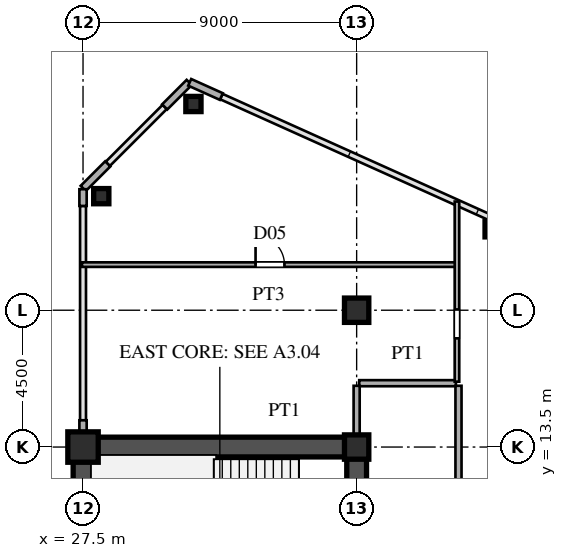
"""IFC4 building model, lengths in metres.
Left out: names, types, materials, properties, quantities, classifications, styles, units other than length and angle.
Written with IfcOpenShell. Run it as: python <this file> out.ifc"""

import sys

from ifc_helpers import new_model, si_unit, direction, frame, frame_2d, origin, origin_2d, place, context, subcontext, project, spatial, rectangle, hollow_rectangle, i_section, extrude, source, transform, mapped, element, fill, save


model = new_model("IFC4")
c1 = context("Model", 3, precision=1e-05, world=origin(), true_north=direction((0.0, 1.0)))
c2 = subcontext(c1, "Body", "Model", "MODEL_VIEW")
j1 = project(units=[si_unit("LENGTHUNIT", "METRE"), si_unit("PLANEANGLEUNIT", "RADIAN")], contexts=[c1])
p1 = place(None, origin())
s1 = spatial("IfcSite", under=j1, at=p1, CompositionType="ELEMENT")
p2 = place(p1, origin())
s2 = spatial("IfcBuilding", under=s1, at=p2, CompositionType="ELEMENT")
p3 = place(p2, frame((0.0, 0.0, 96.0)))
s3 = spatial("IfcBuildingStorey", under=s2, at=p3, CompositionType="ELEMENT", Elevation=96.0)
m1 = source(origin(), c2, "Body", "SweptSolid", [
    extrude(hollow_rectangle(XDim=1.0, YDim=1.0, WallThickness=0.042, at=origin_2d()), origin(), (0.0, 0.0, 1.0), 3.6),
])
p4 = place(p3, frame((27.5, 13.5, 0.0), z_axis=(0.0, 0.0, 1.0), x_axis=(1.0, 0.0, 0.0)))
e1 = element("IfcColumn", 1, at=p4, inside=s3, PredefinedType="COLUMN", context=c2, shape_type="MappedRepresentation", body=[
    mapped(m1, transform((0.0, 0.0, 0.0), scale=1.0)),
])
m2 = source(origin(), c2, "Body", "SweptSolid", [
    extrude(i_section(OverallWidth=0.8, OverallDepth=0.8, WebThickness=0.032, FlangeThickness=0.05, at=origin_2d()), origin(), (0.0, 0.0, 1.0), 3.6),
])
for number, where, z_axis, x_axis in (
    (2, (36.5, 13.5, 0.0), (0.0, 0.0, 1.0), (1.0, 0.0, 0.0)),
    (3, (36.5, 18.0, 0.0), (0.0, 0.0, 1.0), (1.0, 0.0, 0.0)),
):
    element("IfcColumn", number, at=place(p3, frame(where, z_axis=z_axis, x_axis=x_axis)), inside=s3, PredefinedType="COLUMN", context=c2, shape_type="MappedRepresentation", body=[
        mapped(m2, transform((0.0, 0.0, 0.0), scale=1.0)),
    ])
m3 = source(origin(), c2, "Body", "SweptSolid", [
    extrude(hollow_rectangle(XDim=0.5, YDim=0.5, WallThickness=0.02, at=origin_2d()), origin(), (0.0, 0.0, 1.0), 3.6),
])
for number, where, z_axis, x_axis in (
    (4, (31.131, 24.783, 0.0), (0.0, 0.0, 1.0), (1.0, 0.0, 0.0)),
    (5, (28.1, 21.751, 0.0), (0.0, 0.0, 1.0), (1.0, 0.0, 0.0)),
    (6, (40.973, 20.661, 0.0), (0.0, 0.0, 1.0), (1.0, 0.0, 0.0)),
):
    element("IfcColumn", number, at=place(p3, frame(where, z_axis=z_axis, x_axis=x_axis)), inside=s3, PredefinedType="COLUMN", context=c2, shape_type="MappedRepresentation", body=[
        mapped(m3, transform((0.0, 0.0, 0.0), scale=1.0)),
    ])
p5 = place(p3, frame((32.049, 25.028, 0.0), z_axis=(0.0, 0.0, 1.0), x_axis=(-0.911929519623, 0.410346866979, 0.0)))
e7 = element("IfcWall", 7, at=p5, inside=s3, PredefinedType="SOLIDWALL", context=c2, shape_type="SweptSolid", body=[
    extrude(rectangle(XDim=1.14, YDim=0.24, at=frame_2d((0.57, 0.0))), origin(), (0.0, 0.0, 1.0), 3.38),
])
for number, where, z_axis, x_axis in (
    (8, (30.993, 25.493, 0.0), (0.0, 0.0, 1.0), (-0.707, -0.707, 0.0)),
    (9, (28.313, 22.813, 0.0), (0.0, 0.0, 1.0), (-0.707, -0.707, 0.0)),
):
    element("IfcWall", number, at=place(p3, frame(where, z_axis=z_axis, x_axis=x_axis)), inside=s3, PredefinedType="SOLIDWALL", context=c2, shape_type="SweptSolid", body=[
        extrude(rectangle(XDim=1.14, YDim=0.24, at=frame_2d((0.57, 0.0))), origin(), (0.0, 0.0, 1.0), 3.38),
    ])
p6 = place(p3, frame((27.5, 13.83, 0.0), z_axis=(0.0, 0.0, 1.0), x_axis=(0.0, 1.0, 0.0)))
e10 = element("IfcWall", 10, at=p6, inside=s3, PredefinedType="SOLIDWALL", context=c2, shape_type="SweptSolid", body=[
    extrude(rectangle(XDim=0.55, YDim=0.24, at=frame_2d((0.275, 0.0))), origin(), (0.0, 0.0, 1.0), 2.88),
])
p7 = place(p3, frame((27.5, 21.43, 0.0), z_axis=(0.0, 0.0, 1.0), x_axis=(0.0, 1.0, 0.0)))
e11 = element("IfcWall", 11, at=p7, inside=s3, PredefinedType="SOLIDWALL", context=c2, shape_type="SweptSolid", body=[
    extrude(rectangle(XDim=0.55, YDim=0.24, at=frame_2d((0.275, 0.0))), origin(), (0.0, 0.0, 1.0), 3.38),
])
p8 = place(p3, frame((27.5, 1.3, 0.0), z_axis=(0.0, 0.0, 1.0), x_axis=(0.0, 1.0, 0.0)))
e12 = element("IfcWall", 12, at=p8, inside=s3, PredefinedType="SHEAR", context=c2, shape_type="SweptSolid", body=[
    extrude(rectangle(XDim=12.2, YDim=0.65, at=frame_2d((6.1, 0.0))), origin(), (0.0, 0.0, 1.0), 3.38),
])
p9 = place(p3, frame((27.5, 13.5, 0.0), z_axis=(0.0, 0.0, 1.0), x_axis=(1.0, 0.0, 0.0)))
e13 = element("IfcWall", 13, at=p9, inside=s3, PredefinedType="SHEAR", context=c2, shape_type="SweptSolid", body=[
    extrude(rectangle(XDim=9.0, YDim=0.65, at=frame_2d((4.5, 0.0))), origin(), (0.0, 0.0, 1.0), 3.38),
])
p10 = place(p3, frame((36.5, 8.2, 0.0), z_axis=(0.0, 0.0, 1.0), x_axis=(0.0, 1.0, 0.0)))
e14 = element("IfcWall", 14, at=p10, inside=s3, PredefinedType="SHEAR", context=c2, shape_type="SweptSolid", body=[
    extrude(rectangle(XDim=5.45, YDim=0.65, at=frame_2d((2.725, 0.0))), origin(), (0.0, 0.0, 1.0), 3.38),
])
p11 = place(p10, frame((0.245, 0.0, 0.0)))
e15 = element("IfcOpeningElement", 15, at=p11, cuts=e14, PredefinedType="OPENING", context=c2, shape_type="SweptSolid", body=[
    extrude(rectangle(XDim=0.95, YDim=2.15, at=frame_2d((0.475, 1.075))), frame((0.0, 0.335, 0.0), z_axis=(0.0, -1.0, 0.0), x_axis=(1.0, 0.0, 0.0)), (0.0, 0.0, 1.0), 0.67),
])
p12 = place(p3, frame((36.585, 15.6, 0.0), z_axis=(0.0, 0.0, 1.0), x_axis=(1.0, 0.0, 0.0)))
e16 = element("IfcWall", 16, at=p12, inside=s3, PredefinedType="PARTITIONING", context=c2, shape_type="SweptSolid", body=[
    extrude(rectangle(XDim=3.18, YDim=0.2, at=frame_2d((1.59, 0.0))), origin(), (0.0, 0.0, 1.0), 3.38),
])
p13 = place(p3, frame((27.465, 19.5, 0.0), z_axis=(0.0, 0.0, 1.0), x_axis=(1.0, 0.0, 0.0)))
e17 = element("IfcWall", 17, at=p13, inside=s3, PredefinedType="PARTITIONING", context=c2, shape_type="SweptSolid", body=[
    extrude(rectangle(XDim=12.285, YDim=0.15, at=frame_2d((6.143, 0.0))), origin(), (0.0, 0.0, 1.0), 3.38),
])
p14 = place(p13, frame((5.71, 0.0, 0.0)))
e18 = element("IfcOpeningElement", 18, at=p14, cuts=e17, PredefinedType="OPENING", context=c2, shape_type="SweptSolid", body=[
    extrude(rectangle(XDim=0.95, YDim=2.15, at=frame_2d((0.475, 1.075))), frame((0.0, 0.085, 0.0), z_axis=(0.0, -1.0, 0.0), x_axis=(1.0, 0.0, 0.0)), (0.0, 0.0, 1.0), 0.17),
])
p15 = place(p3, frame((36.5, 13.83, 0.0), z_axis=(0.0, 0.0, 1.0), x_axis=(0.0, 1.0, 0.0)))
e19 = element("IfcWall", 19, at=p15, inside=s3, PredefinedType="PARTITIONING", context=c2, shape_type="SweptSolid", body=[
    extrude(rectangle(XDim=1.685, YDim=0.2, at=frame_2d((0.842, 0.0))), origin(), (0.0, 0.0, 1.0), 2.68),
])
p16 = place(p3, frame((39.8, 15.65, 0.0), z_axis=(0.0, 0.0, 1.0), x_axis=(0.0, 1.0, 0.0)))
e20 = element("IfcWall", 20, at=p16, inside=s3, PredefinedType="PARTITIONING", context=c2, shape_type="SweptSolid", body=[
    extrude(rectangle(XDim=5.925, YDim=0.15, at=frame_2d((2.962, 0.0))), origin(), (0.0, 0.0, 1.0), 3.38),
])
p17 = place(p16, frame((1.425, 0.0, 0.0)))
e21 = element("IfcOpeningElement", 21, at=p17, cuts=e20, PredefinedType="OPENING", context=c2, shape_type="SweptSolid", body=[
    extrude(rectangle(XDim=0.95, YDim=2.15, at=frame_2d((0.475, 1.075))), frame((0.0, 0.085, 0.0), z_axis=(0.0, -1.0, 0.0), x_axis=(1.0, 0.0, 0.0)), (0.0, 0.0, 1.0), 0.17),
])
p18 = place(p3, frame((39.85, -15.515, 0.0), z_axis=(0.0, 0.0, 1.0), x_axis=(0.0, 1.0, 0.0)))
e22 = element("IfcWall", 22, at=p18, inside=s3, PredefinedType="PARTITIONING", context=c2, shape_type="SweptSolid", body=[
    extrude(rectangle(XDim=31.03, YDim=0.2, at=frame_2d((15.515, 0.0))), origin(), (0.0, 0.0, 1.0), 3.38),
])
p19 = place(p18, frame((0.94, 0.0, 0.0)))
e23 = element("IfcOpeningElement", 23, at=p19, cuts=e22, PredefinedType="OPENING", context=c2, shape_type="SweptSolid", body=[
    extrude(rectangle(XDim=1.05, YDim=2.25, at=frame_2d((0.525, 1.125))), frame((0.0, 0.11, 0.0), z_axis=(0.0, -1.0, 0.0), x_axis=(1.0, 0.0, 0.0)), (0.0, 0.0, 1.0), 0.22),
])
p20 = place(p18, frame((9.765, 0.0, 0.0)))
e24 = element("IfcOpeningElement", 24, at=p20, cuts=e22, PredefinedType="OPENING", context=c2, shape_type="SweptSolid", body=[
    extrude(rectangle(XDim=1.05, YDim=2.25, at=frame_2d((0.525, 1.125))), frame((0.0, 0.11, 0.0), z_axis=(0.0, -1.0, 0.0), x_axis=(1.0, 0.0, 0.0)), (0.0, 0.0, 1.0), 0.22),
])
p21 = place(p18, frame((24.067, 0.0, 0.0)))
e25 = element("IfcOpeningElement", 25, at=p21, cuts=e22, PredefinedType="OPENING", context=c2, shape_type="SweptSolid", body=[
    extrude(rectangle(XDim=1.05, YDim=2.25, at=frame_2d((0.525, 1.125))), frame((0.0, 0.11, 0.0), z_axis=(0.0, -1.0, 0.0), x_axis=(1.0, 0.0, 0.0)), (0.0, 0.0, 1.0), 0.22),
])
m4 = source(origin(), c2, "Body", "SweptSolid", [
    extrude(rectangle(XDim=0.95, YDim=2.15, at=frame_2d((0.475, 1.075))), frame((0.0, 0.025, 0.0), z_axis=(0.0, -1.0, 0.0), x_axis=(1.0, 0.0, 0.0)), (0.0, 0.0, 1.0), 0.05),
])
p22 = place(p14, origin())
e26 = element("IfcDoor", 26, at=p22, inside=s3, OperationType="SINGLE_SWING_LEFT", PredefinedType="DOOR", context=c2, shape_type="MappedRepresentation", body=[
    mapped(m4, transform((0.0, 0.0, 0.0), scale=1.0)),
])
fill(e18, e26)
save(model, sys.argv[1])
